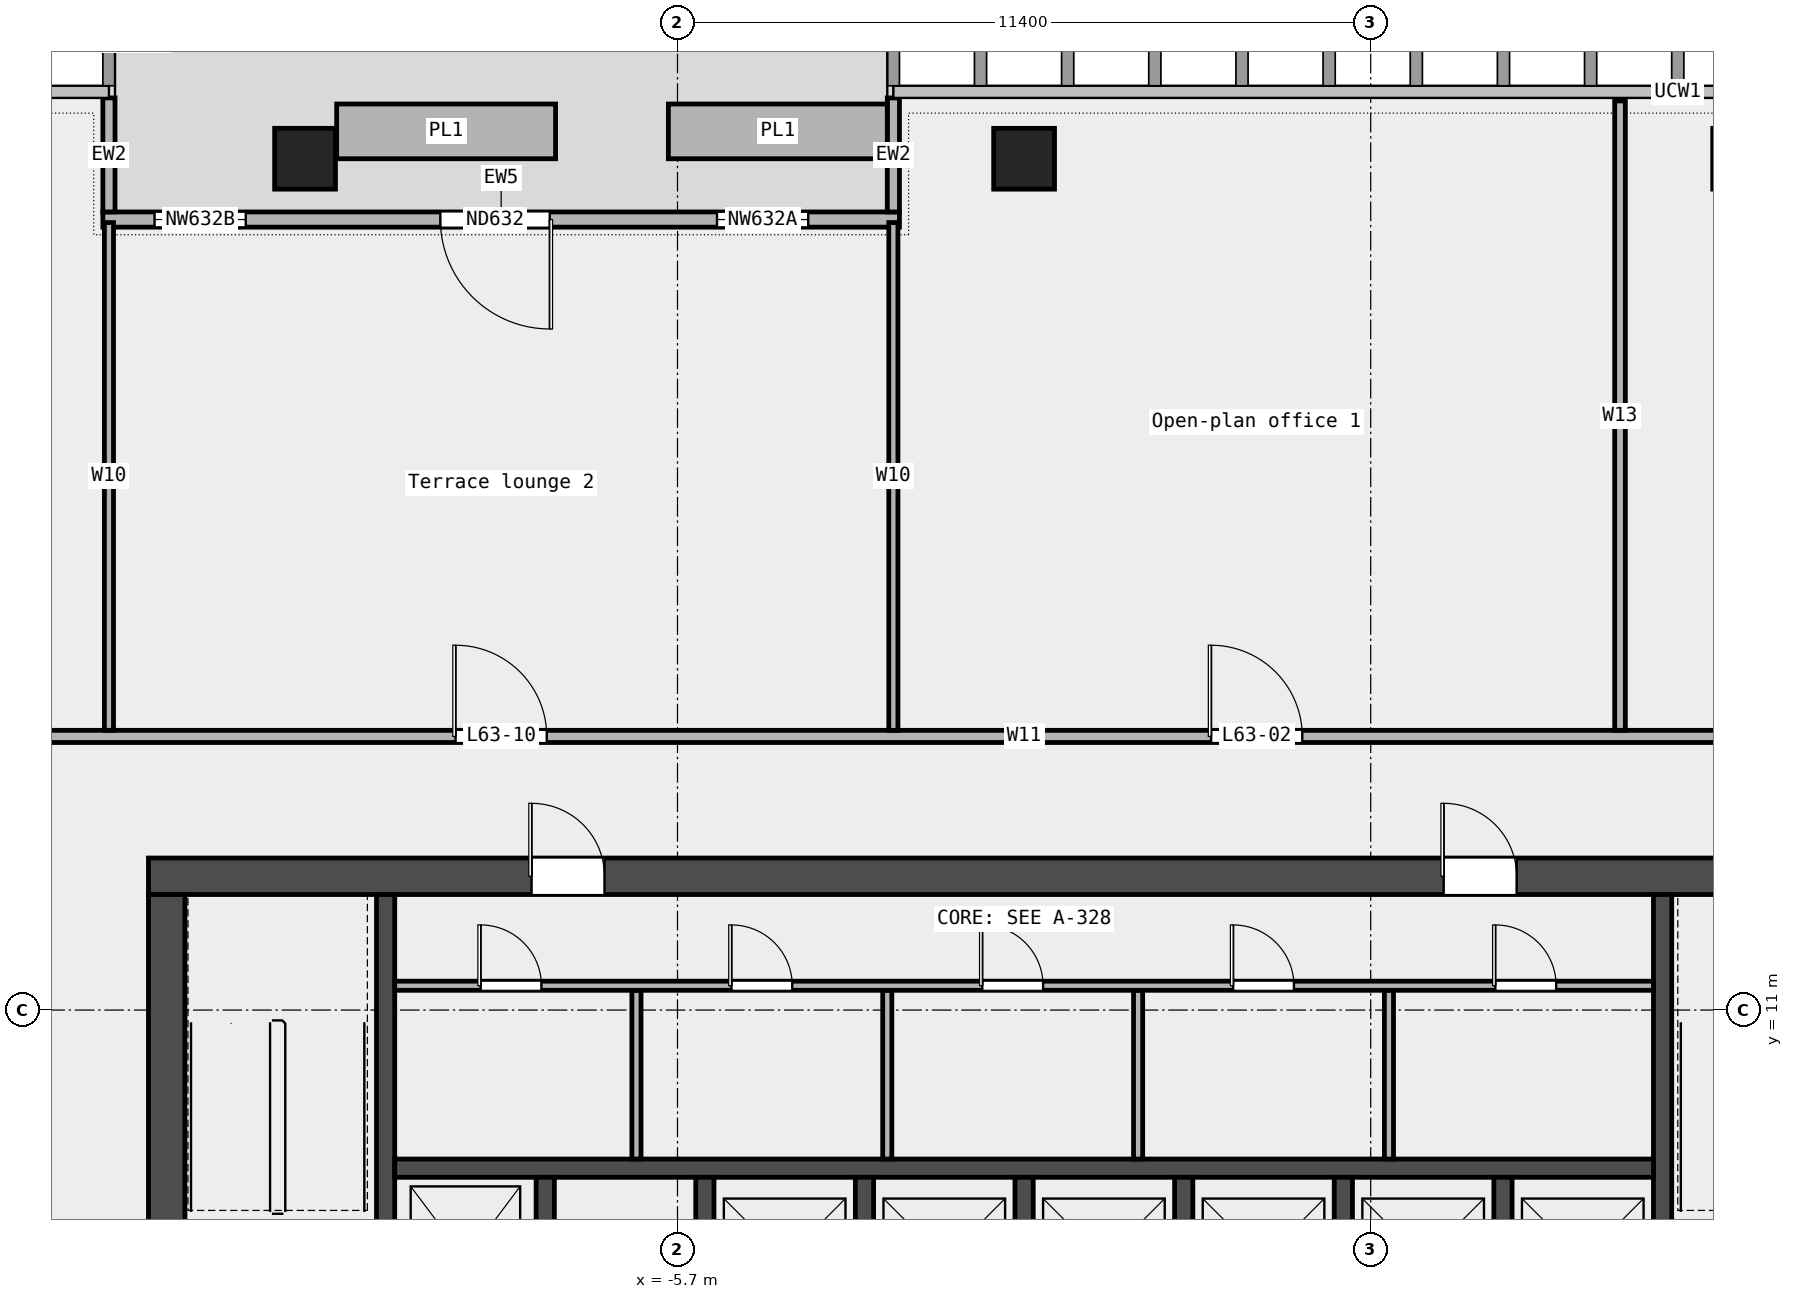
"""IFC4 building model, lengths in metres.
Left out: names, types, materials, properties, quantities, classifications, styles, units other than length and angle.
Written with IfcOpenShell. Run it as: python <this file> out.ifc"""

import sys

from ifc_helpers import new_model, si_unit, direction, frame, frame_2d, origin, origin_2d, place, context, subcontext, project, spatial, rectangle, extrude, element, fill, save


model = new_model("IFC4")
c1 = context("Model", 3, precision=1e-05, world=origin(), true_north=direction((0.0, 1.0)))
c2 = subcontext(c1, "Body", "Model", "MODEL_VIEW")
j1 = project(units=[si_unit("LENGTHUNIT", "METRE"), si_unit("PLANEANGLEUNIT", "RADIAN")], contexts=[c1])
p1 = place(None, origin())
s1 = spatial("IfcSite", under=j1, at=p1, CompositionType="ELEMENT")
p2 = place(p1, origin())
s2 = spatial("IfcBuilding", under=s1, at=p2, CompositionType="ELEMENT")
p3 = place(p2, frame((0.0, 0.0, 291.4)))
s3 = spatial("IfcBuildingStorey", under=s2, at=p3, CompositionType="ELEMENT", Elevation=291.4)
for number, where, z_axis, x_axis in (
    (1, (11.825, 25.0, 0.0), (0.0, 0.0, 1.0), (1.0, 0.0, 0.0)),
    (2, (0.0, 25.0, 0.0), (0.0, 0.0, 1.0), (1.0, 0.0, 0.0)),
    (3, (-11.825, 25.0, 0.0), (0.0, 0.0, 1.0), (1.0, 0.0, 0.0)),
):
    element("IfcColumn", number, at=place(p3, frame(where, z_axis=z_axis, x_axis=x_axis)), inside=s3, PredefinedType="COLUMN", context=c2, shape_type="SweptSolid", body=[
        extrude(rectangle(XDim=1.0, YDim=1.0, at=origin_2d()), origin(), (0.0, 0.0, 1.0), 3.6),
    ])
p4 = place(p3, frame((-2.05, 24.0, 0.0), z_axis=(0.0, 0.0, 1.0), x_axis=(-1.0, 0.0, 0.0)))
e4 = element("IfcWall", 4, at=p4, inside=s3, PredefinedType="STANDARD", context=c2, shape_type="SweptSolid", body=[
    extrude(rectangle(XDim=13.1, YDim=0.25, at=frame_2d((6.55, 0.0))), origin(), (0.0, 0.0, 1.0), 3.6),
])
p5 = place(p4, frame((1.5, 0.0, 0.45)))
e5 = element("IfcOpeningElement", 5, at=p5, cuts=e4, PredefinedType="OPENING", context=c2, shape_type="SweptSolid", body=[
    extrude(rectangle(XDim=1.5, YDim=2.4, at=frame_2d((0.75, 1.2))), frame((0.0, 0.137, 0.0), z_axis=(0.0, -1.0, 0.0), x_axis=(1.0, 0.0, 0.0)), (0.0, 0.0, 1.0), 0.274),
])
p6 = place(p4, frame((5.75, 0.0, 0.0)))
e6 = element("IfcOpeningElement", 6, at=p6, cuts=e4, PredefinedType="OPENING", context=c2, shape_type="SweptSolid", body=[
    extrude(rectangle(XDim=1.8, YDim=2.4, at=frame_2d((0.9, 1.2))), frame((0.0, 0.137, 0.0), z_axis=(0.0, -1.0, 0.0), x_axis=(1.0, 0.0, 0.0)), (0.0, 0.0, 1.0), 0.274),
])
p7 = place(p4, frame((10.75, 0.0, 0.45)))
e7 = element("IfcOpeningElement", 7, at=p7, cuts=e4, PredefinedType="OPENING", context=c2, shape_type="SweptSolid", body=[
    extrude(rectangle(XDim=1.5, YDim=2.4, at=frame_2d((0.75, 1.2))), frame((0.0, 0.137, 0.0), z_axis=(0.0, -1.0, 0.0), x_axis=(1.0, 0.0, 0.0)), (0.0, 0.0, 1.0), 0.274),
])
for number, where, z_axis, x_axis in (
    (8, (-2.15, 26.0, 0.0), (0.0, 0.0, 1.0), (0.0, -1.0, 0.0)),
    (9, (-15.05, 26.0, 0.0), (0.0, 0.0, 1.0), (0.0, -1.0, 0.0)),
):
    element("IfcWall", number, at=place(p3, frame(where, z_axis=z_axis, x_axis=x_axis)), inside=s3, PredefinedType="STANDARD", context=c2, shape_type="SweptSolid", body=[
        extrude(rectangle(XDim=1.875, YDim=0.2, at=frame_2d((0.938, 0.0))), origin(), (0.0, 0.0, 1.0), 3.6),
    ])
for number, where, z_axis, x_axis in (
    (10, (-2.25, 25.45, 0.0), (0.0, 0.0, 1.0), (-1.0, 0.0, 0.0)),
    (11, (-7.705, 25.45, 0.0), (0.0, 0.0, 1.0), (-1.0, 0.0, 0.0)),
):
    element("IfcWall", number, at=place(p3, frame(where, z_axis=z_axis, x_axis=x_axis)), inside=s3, PredefinedType="STANDARD", context=c2, shape_type="SweptSolid", body=[
        extrude(rectangle(XDim=3.6, YDim=0.9, at=frame_2d((1.8, 0.0))), origin(), (0.0, 0.0, 1.0), 0.7),
    ])
p8 = place(p3, frame((-29.6, 15.5, 0.0), z_axis=(0.0, 0.0, 1.0), x_axis=(1.0, 0.0, 0.0)))
e12 = element("IfcWall", 12, at=p8, inside=s3, PredefinedType="PARTITIONING", context=c2, shape_type="SweptSolid", body=[
    extrude(rectangle(XDim=59.2, YDim=0.2, at=frame_2d((29.6, 0.0))), origin(), (0.0, 0.0, 1.0), 3.6),
])
p9 = place(p8, frame((48.3, 0.0, 0.0)))
e13 = element("IfcOpeningElement", 13, at=p9, cuts=e12, PredefinedType="OPENING", context=c2, shape_type="SweptSolid", body=[
    extrude(rectangle(XDim=1.8, YDim=2.1, at=frame_2d((0.9, 1.05))), frame((0.0, 0.112, 0.0), z_axis=(0.0, -1.0, 0.0), x_axis=(1.0, 0.0, 0.0)), (0.0, 0.0, 1.0), 0.224),
])
p10 = place(p8, frame((32.675, 0.0, 0.0)))
e14 = element("IfcOpeningElement", 14, at=p10, cuts=e12, PredefinedType="OPENING", context=c2, shape_type="SweptSolid", body=[
    extrude(rectangle(XDim=1.5, YDim=2.1, at=frame_2d((0.75, 1.05))), frame((0.0, 0.112, 0.0), z_axis=(0.0, -1.0, 0.0), x_axis=(1.0, 0.0, 0.0)), (0.0, 0.0, 1.0), 0.224),
])
p11 = place(p8, frame((6.625, 0.0, 0.0)))
e15 = element("IfcOpeningElement", 15, at=p11, cuts=e12, PredefinedType="OPENING", context=c2, shape_type="SweptSolid", body=[
    extrude(rectangle(XDim=1.5, YDim=2.1, at=frame_2d((0.75, 1.05))), frame((0.0, 0.112, 0.0), z_axis=(0.0, -1.0, 0.0), x_axis=(1.0, 0.0, 0.0)), (0.0, 0.0, 1.0), 0.224),
])
p12 = place(p8, frame((20.25, 0.0, 0.0)))
e16 = element("IfcOpeningElement", 16, at=p12, cuts=e12, PredefinedType="OPENING", context=c2, shape_type="SweptSolid", body=[
    extrude(rectangle(XDim=1.5, YDim=2.1, at=frame_2d((0.75, 1.05))), frame((0.0, 0.112, 0.0), z_axis=(0.0, -1.0, 0.0), x_axis=(1.0, 0.0, 0.0)), (0.0, 0.0, 1.0), 0.224),
])
for number, where, z_axis, x_axis in (
    (17, (-15.05, 15.6, 0.0), (0.0, 0.0, 1.0), (0.0, 1.0, 0.0)),
    (18, (-2.15, 15.6, 0.0), (0.0, 0.0, 1.0), (0.0, 1.0, 0.0)),
):
    element("IfcWall", number, at=place(p3, frame(where, z_axis=z_axis, x_axis=x_axis)), inside=s3, PredefinedType="PARTITIONING", context=c2, shape_type="SweptSolid", body=[
        extrude(rectangle(XDim=8.35, YDim=0.15, at=frame_2d((4.175, 0.0))), origin(), (0.0, 0.0, 1.0), 3.6),
    ])
p13 = place(p3, frame((9.8, 15.6, 0.0), z_axis=(0.0, 0.0, 1.0), x_axis=(0.0, 1.0, 0.0)))
e19 = element("IfcWall", 19, at=p13, inside=s3, PredefinedType="PARTITIONING", context=c2, shape_type="SweptSolid", body=[
    extrude(rectangle(XDim=10.35, YDim=0.175, at=frame_2d((5.175, 0.0))), origin(), (0.0, 0.0, 1.0), 3.6),
])
p14 = place(p3, frame((-14.4, 13.2, 0.0), z_axis=(0.0, 0.0, 1.0), x_axis=(1.0, 0.0, 0.0)))
e20 = element("IfcWall", 20, at=p14, inside=s3, PredefinedType="SHEAR", context=c2, shape_type="SweptSolid", body=[
    extrude(rectangle(XDim=28.8, YDim=0.6, at=frame_2d((14.4, 0.0))), origin(), (0.0, 0.0, 1.0), 3.7),
])
p15 = place(p14, frame((6.3, 0.0, 0.0)))
e21 = element("IfcOpeningElement", 21, at=p15, cuts=e20, PredefinedType="OPENING", context=c2, shape_type="SweptSolid", body=[
    extrude(rectangle(XDim=1.2, YDim=2.1, at=frame_2d((0.6, 1.05))), frame((0.0, 0.312, 0.0), z_axis=(0.0, -1.0, 0.0), x_axis=(1.0, 0.0, 0.0)), (0.0, 0.0, 1.0), 0.624),
])
p16 = place(p14, frame((21.3, 0.0, 0.0)))
e22 = element("IfcOpeningElement", 22, at=p16, cuts=e20, PredefinedType="OPENING", context=c2, shape_type="SweptSolid", body=[
    extrude(rectangle(XDim=1.2, YDim=2.1, at=frame_2d((0.6, 1.05))), frame((0.0, 0.312, 0.0), z_axis=(0.0, -1.0, 0.0), x_axis=(1.0, 0.0, 0.0)), (0.0, 0.0, 1.0), 0.624),
])
p17 = place(p3, frame((-14.1, -6.6, 0.0), z_axis=(0.0, 0.0, 1.0), x_axis=(0.0, 1.0, 0.0)))
e23 = element("IfcWall", 23, at=p17, inside=s3, PredefinedType="SHEAR", context=c2, shape_type="SweptSolid", body=[
    extrude(rectangle(XDim=19.5, YDim=0.6, at=frame_2d((9.75, 0.0))), origin(), (0.0, 0.0, 1.0), 3.7),
])
p18 = place(p17, frame((9.3, 0.0, 0.0)))
e24 = element("IfcOpeningElement", 24, at=p18, cuts=e23, PredefinedType="OPENING", context=c2, shape_type="SweptSolid", body=[
    extrude(rectangle(XDim=1.8, YDim=2.1, at=frame_2d((0.9, 1.05))), frame((0.0, 0.312, 0.0), z_axis=(0.0, -1.0, 0.0), x_axis=(1.0, 0.0, 0.0)), (0.0, 0.0, 1.0), 0.624),
])
for number, where, z_axis, x_axis in (
    (25, (-10.5, 5.25, 0.0), (0.0, 0.0, 1.0), (0.0, 1.0, 0.0)),
    (26, (10.5, 5.25, 0.0), (0.0, 0.0, 1.0), (0.0, 1.0, 0.0)),
):
    element("IfcWall", number, at=place(p3, frame(where, z_axis=z_axis, x_axis=x_axis)), inside=s3, PredefinedType="SHEAR", context=c2, shape_type="SweptSolid", body=[
        extrude(rectangle(XDim=7.65, YDim=0.3, at=frame_2d((3.825, 0.0))), origin(), (0.0, 0.0, 1.0), 3.7),
    ])
p19 = place(p3, frame((-10.35, 8.4, 0.0), z_axis=(0.0, 0.0, 1.0), x_axis=(1.0, 0.0, 0.0)))
e27 = element("IfcWall", 27, at=p19, inside=s3, PredefinedType="SOLIDWALL", context=c2, shape_type="SweptSolid", body=[
    extrude(rectangle(XDim=20.7, YDim=0.3, at=frame_2d((10.35, 0.0))), origin(), (0.0, 0.0, 1.0), 3.7),
])
for number, where, z_axis, x_axis in (
    (28, (-7.875, 5.55, 0.0), (0.0, 0.0, 1.0), (0.0, 1.0, 0.0)),
    (29, (-5.25, 5.55, 0.0), (0.0, 0.0, 1.0), (0.0, 1.0, 0.0)),
    (30, (-2.625, 5.55, 0.0), (0.0, 0.0, 1.0), (0.0, 1.0, 0.0)),
    (31, (0.0, 5.55, 0.0), (0.0, 0.0, 1.0), (0.0, 1.0, 0.0)),
    (32, (2.625, 5.55, 0.0), (0.0, 0.0, 1.0), (0.0, 1.0, 0.0)),
    (33, (5.25, 5.55, 0.0), (0.0, 0.0, 1.0), (0.0, 1.0, 0.0)),
    (34, (7.875, 5.55, 0.0), (0.0, 0.0, 1.0), (0.0, 1.0, 0.0)),
):
    element("IfcWall", number, at=place(p3, frame(where, z_axis=z_axis, x_axis=x_axis)), inside=s3, PredefinedType="SOLIDWALL", context=c2, shape_type="SweptSolid", body=[
        extrude(rectangle(XDim=2.7, YDim=0.3, at=frame_2d((1.35, 0.0))), origin(), (0.0, 0.0, 1.0), 3.7),
    ])
for number, where, z_axis, x_axis in (
    (35, (-6.375, 8.55, 0.0), (0.0, 0.0, 1.0), (0.0, 1.0, 0.0)),
    (36, (-2.25, 8.55, 0.0), (0.0, 0.0, 1.0), (0.0, 1.0, 0.0)),
    (37, (1.875, 8.55, 0.0), (0.0, 0.0, 1.0), (0.0, 1.0, 0.0)),
    (38, (6.0, 8.55, 0.0), (0.0, 0.0, 1.0), (0.0, 1.0, 0.0)),
):
    element("IfcWall", number, at=place(p3, frame(where, z_axis=z_axis, x_axis=x_axis)), inside=s3, PredefinedType="PARTITIONING", context=c2, shape_type="SweptSolid", body=[
        extrude(rectangle(XDim=2.775, YDim=0.15, at=frame_2d((1.387, 0.0))), origin(), (0.0, 0.0, 1.0), 3.7),
    ])
p20 = place(p3, frame((-10.35, 11.4, 0.0), z_axis=(0.0, 0.0, 1.0), x_axis=(1.0, 0.0, 0.0)))
e39 = element("IfcWall", 39, at=p20, inside=s3, PredefinedType="PARTITIONING", context=c2, shape_type="SweptSolid", body=[
    extrude(rectangle(XDim=20.7, YDim=0.15, at=frame_2d((10.35, 0.0))), origin(), (0.0, 0.0, 1.0), 3.7),
])
p21 = place(p20, frame((1.413, 0.0, 0.0)))
e40 = element("IfcOpeningElement", 40, at=p21, cuts=e39, PredefinedType="OPENING", context=c2, shape_type="SweptSolid", body=[
    extrude(rectangle(XDim=1.0, YDim=2.1, at=frame_2d((0.5, 1.05))), frame((0.0, 0.087, 0.0), z_axis=(0.0, -1.0, 0.0), x_axis=(1.0, 0.0, 0.0)), (0.0, 0.0, 1.0), 0.174),
])
p22 = place(p20, frame((5.538, 0.0, 0.0)))
e41 = element("IfcOpeningElement", 41, at=p22, cuts=e39, PredefinedType="OPENING", context=c2, shape_type="SweptSolid", body=[
    extrude(rectangle(XDim=1.0, YDim=2.1, at=frame_2d((0.5, 1.05))), frame((0.0, 0.087, 0.0), z_axis=(0.0, -1.0, 0.0), x_axis=(1.0, 0.0, 0.0)), (0.0, 0.0, 1.0), 0.174),
])
p23 = place(p20, frame((9.663, 0.0, 0.0)))
e42 = element("IfcOpeningElement", 42, at=p23, cuts=e39, PredefinedType="OPENING", context=c2, shape_type="SweptSolid", body=[
    extrude(rectangle(XDim=1.0, YDim=2.1, at=frame_2d((0.5, 1.05))), frame((0.0, 0.087, 0.0), z_axis=(0.0, -1.0, 0.0), x_axis=(1.0, 0.0, 0.0)), (0.0, 0.0, 1.0), 0.174),
])
p24 = place(p20, frame((13.788, 0.0, 0.0)))
e43 = element("IfcOpeningElement", 43, at=p24, cuts=e39, PredefinedType="OPENING", context=c2, shape_type="SweptSolid", body=[
    extrude(rectangle(XDim=1.0, YDim=2.1, at=frame_2d((0.5, 1.05))), frame((0.0, 0.087, 0.0), z_axis=(0.0, -1.0, 0.0), x_axis=(1.0, 0.0, 0.0)), (0.0, 0.0, 1.0), 0.174),
])
p25 = place(p20, frame((18.1, 0.0, 0.0)))
e44 = element("IfcOpeningElement", 44, at=p25, cuts=e39, PredefinedType="OPENING", context=c2, shape_type="SweptSolid", body=[
    extrude(rectangle(XDim=1.0, YDim=2.1, at=frame_2d((0.5, 1.05))), frame((0.0, 0.087, 0.0), z_axis=(0.0, -1.0, 0.0), x_axis=(1.0, 0.0, 0.0)), (0.0, 0.0, 1.0), 0.174),
])
p26 = place(p5, origin())
e45 = element("IfcWindow", 45, at=p26, inside=s3, PartitioningType="SINGLE_PANEL", PredefinedType="WINDOW", context=c2, shape_type="SweptSolid", body=[
    extrude(rectangle(XDim=1.5, YDim=2.4, at=frame_2d((0.75, 1.2))), frame((0.0, 0.03, 0.0), z_axis=(0.0, -1.0, 0.0), x_axis=(1.0, 0.0, 0.0)), (0.0, 0.0, 1.0), 0.06),
])
fill(e5, e45)
p27 = place(p6, origin())
e46 = element("IfcDoor", 46, at=p27, inside=s3, OperationType="DOUBLE_DOOR_SINGLE_SWING", PredefinedType="DOOR", context=c2, shape_type="SweptSolid", body=[
    extrude(rectangle(XDim=1.8, YDim=2.4, at=frame_2d((0.9, 1.2))), frame((0.0, 0.025, 0.0), z_axis=(0.0, -1.0, 0.0), x_axis=(1.0, 0.0, 0.0)), (0.0, 0.0, 1.0), 0.05),
])
fill(e6, e46)
p28 = place(p7, origin())
e47 = element("IfcWindow", 47, at=p28, inside=s3, PartitioningType="SINGLE_PANEL", PredefinedType="WINDOW", context=c2, shape_type="SweptSolid", body=[
    extrude(rectangle(XDim=1.5, YDim=2.4, at=frame_2d((0.75, 1.2))), frame((0.0, 0.03, 0.0), z_axis=(0.0, -1.0, 0.0), x_axis=(1.0, 0.0, 0.0)), (0.0, 0.0, 1.0), 0.06),
])
fill(e7, e47)
p29 = place(p10, origin())
e48 = element("IfcDoor", 48, at=p29, inside=s3, OperationType="DOUBLE_DOOR_SINGLE_SWING", PredefinedType="DOOR", context=c2, shape_type="SweptSolid", body=[
    extrude(rectangle(XDim=1.5, YDim=2.1, at=frame_2d((0.75, 1.05))), frame((0.0, 0.025, 0.0), z_axis=(0.0, -1.0, 0.0), x_axis=(1.0, 0.0, 0.0)), (0.0, 0.0, 1.0), 0.05),
])
fill(e14, e48)
p30 = place(p12, origin())
e49 = element("IfcDoor", 49, at=p30, inside=s3, OperationType="DOUBLE_DOOR_SINGLE_SWING", PredefinedType="DOOR", context=c2, shape_type="SweptSolid", body=[
    extrude(rectangle(XDim=1.5, YDim=2.1, at=frame_2d((0.75, 1.05))), frame((0.0, 0.025, 0.0), z_axis=(0.0, -1.0, 0.0), x_axis=(1.0, 0.0, 0.0)), (0.0, 0.0, 1.0), 0.05),
])
fill(e16, e49)
p31 = place(p21, origin())
e50 = element("IfcDoor", 50, at=p31, inside=s3, OperationType="SINGLE_SWING_LEFT", PredefinedType="DOOR", context=c2, shape_type="SweptSolid", body=[
    extrude(rectangle(XDim=1.0, YDim=2.1, at=frame_2d((0.5, 1.05))), frame((0.0, 0.025, 0.0), z_axis=(0.0, -1.0, 0.0), x_axis=(1.0, 0.0, 0.0)), (0.0, 0.0, 1.0), 0.05),
])
fill(e40, e50)
p32 = place(p22, origin())
e51 = element("IfcDoor", 51, at=p32, inside=s3, OperationType="SINGLE_SWING_LEFT", PredefinedType="DOOR", context=c2, shape_type="SweptSolid", body=[
    extrude(rectangle(XDim=1.0, YDim=2.1, at=frame_2d((0.5, 1.05))), frame((0.0, 0.025, 0.0), z_axis=(0.0, -1.0, 0.0), x_axis=(1.0, 0.0, 0.0)), (0.0, 0.0, 1.0), 0.05),
])
fill(e41, e51)
p33 = place(p23, origin())
e52 = element("IfcDoor", 52, at=p33, inside=s3, OperationType="SINGLE_SWING_LEFT", PredefinedType="DOOR", context=c2, shape_type="SweptSolid", body=[
    extrude(rectangle(XDim=1.0, YDim=2.1, at=frame_2d((0.5, 1.05))), frame((0.0, 0.025, 0.0), z_axis=(0.0, -1.0, 0.0), x_axis=(1.0, 0.0, 0.0)), (0.0, 0.0, 1.0), 0.05),
])
fill(e42, e52)
p34 = place(p24, origin())
e53 = element("IfcDoor", 53, at=p34, inside=s3, OperationType="SINGLE_SWING_LEFT", PredefinedType="DOOR", context=c2, shape_type="SweptSolid", body=[
    extrude(rectangle(XDim=1.0, YDim=2.1, at=frame_2d((0.5, 1.05))), frame((0.0, 0.025, 0.0), z_axis=(0.0, -1.0, 0.0), x_axis=(1.0, 0.0, 0.0)), (0.0, 0.0, 1.0), 0.05),
])
fill(e43, e53)
p35 = place(p25, origin())
e54 = element("IfcDoor", 54, at=p35, inside=s3, OperationType="SINGLE_SWING_LEFT", PredefinedType="DOOR", context=c2, shape_type="SweptSolid", body=[
    extrude(rectangle(XDim=1.0, YDim=2.1, at=frame_2d((0.5, 1.05))), frame((0.0, 0.025, 0.0), z_axis=(0.0, -1.0, 0.0), x_axis=(1.0, 0.0, 0.0)), (0.0, 0.0, 1.0), 0.05),
])
fill(e44, e54)
p36 = place(p15, origin())
e55 = element("IfcDoor", 55, at=p36, inside=s3, OperationType="SINGLE_SWING_LEFT", PredefinedType="DOOR", context=c2, shape_type="SweptSolid", body=[
    extrude(rectangle(XDim=1.2, YDim=2.1, at=frame_2d((0.6, 1.05))), frame((0.0, 0.025, 0.0), z_axis=(0.0, -1.0, 0.0), x_axis=(1.0, 0.0, 0.0)), (0.0, 0.0, 1.0), 0.05),
])
fill(e21, e55)
p37 = place(p16, origin())
e56 = element("IfcDoor", 56, at=p37, inside=s3, OperationType="SINGLE_SWING_RIGHT", PredefinedType="DOOR", context=c2, shape_type="SweptSolid", body=[
    extrude(rectangle(XDim=1.2, YDim=2.1, at=frame_2d((0.6, 1.05))), frame((0.0, 0.025, 0.0), z_axis=(0.0, -1.0, 0.0), x_axis=(1.0, 0.0, 0.0)), (0.0, 0.0, 1.0), 0.05),
])
fill(e22, e56)
save(model, sys.argv[1])
